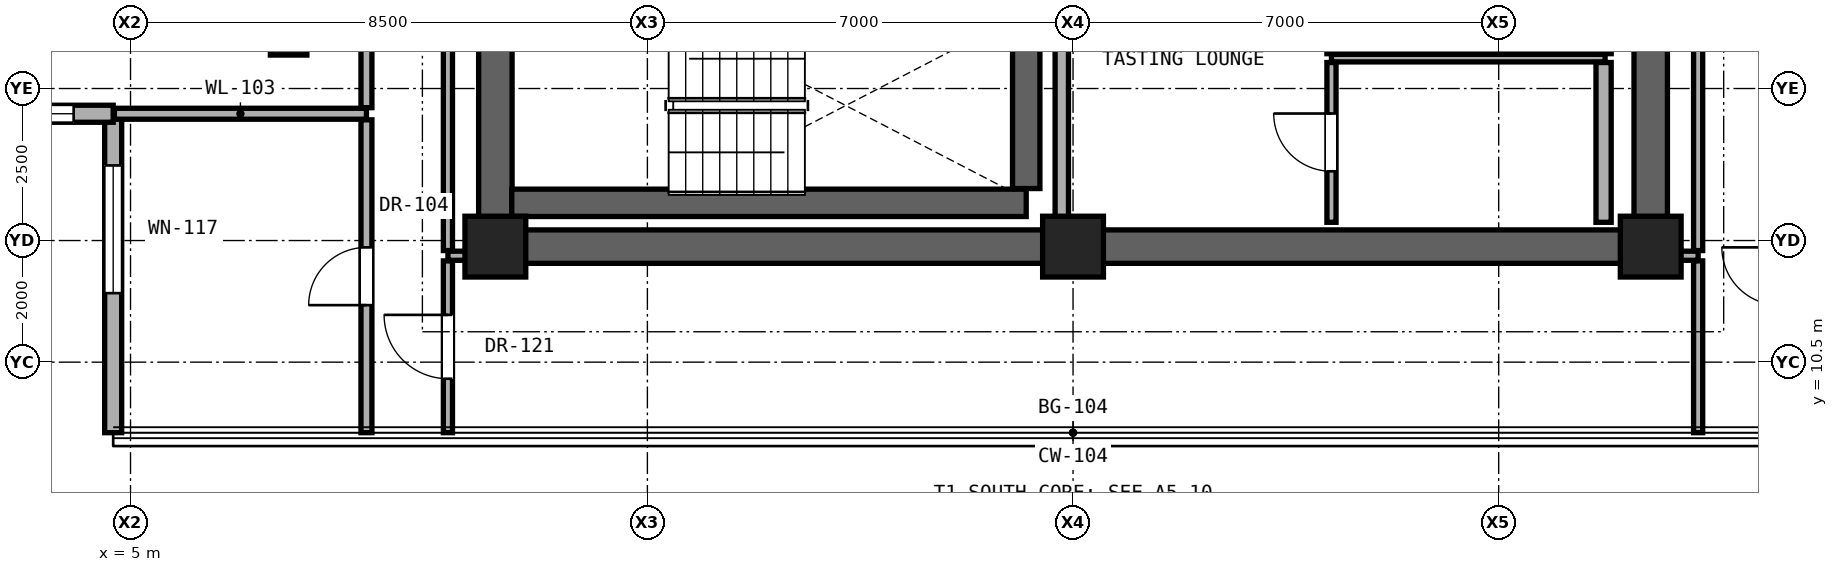
"""IFC4 building model, lengths in metres.
Left out: names, types, materials, properties, quantities, classifications, styles, units other than length and angle.
Written with IfcOpenShell. Run it as: python <this file> out.ifc"""

import sys

from ifc_helpers import new_model, si_unit, direction, frame, frame_2d, origin, origin_2d, place, context, subcontext, project, spatial, rectangle, extrude, element, fill, save


model = new_model("IFC4")
c1 = context("Model", 3, precision=1e-05, world=origin(), true_north=direction((0.0, 1.0)))
c2 = subcontext(c1, "Body", "Model", "MODEL_VIEW")
j1 = project(units=[si_unit("LENGTHUNIT", "METRE"), si_unit("PLANEANGLEUNIT", "RADIAN")], contexts=[c1])
p1 = place(None, origin())
s1 = spatial("IfcSite", under=j1, at=p1, CompositionType="ELEMENT")
p2 = place(p1, origin())
s2 = spatial("IfcBuilding", under=s1, at=p2, CompositionType="ELEMENT")
p3 = place(p2, frame((0.0, 0.0, 170.65)))
s3 = spatial("IfcBuildingStorey", under=s2, at=p3, CompositionType="ELEMENT", Elevation=170.65)
for number, where, z_axis, x_axis in (
    (1, (11.0, 12.4, 0.0), (0.0, 0.0, 1.0), (1.0, 0.0, 0.0)),
    (2, (20.5, 12.4, 0.0), (0.0, 0.0, 1.0), (1.0, 0.0, 0.0)),
    (3, (30.0, 12.4, 0.0), (0.0, 0.0, 1.0), (1.0, 0.0, 0.0)),
):
    element("IfcColumn", number, at=place(p3, frame(where, z_axis=z_axis, x_axis=x_axis)), inside=s3, PredefinedType="COLUMN", context=c2, shape_type="SweptSolid", body=[
        extrude(rectangle(XDim=1.0, YDim=1.0, at=origin_2d()), origin(), (0.0, 0.0, 1.0), 3.25),
    ])
p4 = place(p3, frame((7.6, 16.0, 0.0), z_axis=(0.0, 0.0, 1.0), x_axis=(1.0, 0.0, 0.0)))
e4 = element("IfcColumn", 4, at=p4, inside=s3, PredefinedType="PILASTER", context=c2, shape_type="SweptSolid", body=[
    extrude(rectangle(XDim=0.6, YDim=0.9, at=origin_2d()), origin(), (0.0, 0.0, 1.0), 3.25),
])
p5 = place(p3, frame((11.0, 12.4, 0.0), z_axis=(0.0, 0.0, 1.0), x_axis=(1.0, 0.0, 0.0)))
e5 = element("IfcWall", 5, at=p5, inside=s3, PredefinedType="SHEAR", context=c2, shape_type="SweptSolid", body=[
    extrude(rectangle(XDim=19.0, YDim=0.55, at=frame_2d((9.5, 0.0))), origin(), (0.0, 0.0, 1.0), 3.05),
])
for number, where, z_axis, x_axis in (
    (6, (11.0, 12.4, 0.0), (0.0, 0.0, 1.0), (0.0, 1.0, 0.0)),
    (7, (30.0, 12.4, 0.0), (0.0, 0.0, 1.0), (0.0, 1.0, 0.0)),
):
    element("IfcWall", number, at=place(p3, frame(where, z_axis=z_axis, x_axis=x_axis)), inside=s3, PredefinedType="SHEAR", context=c2, shape_type="SweptSolid", body=[
        extrude(rectangle(XDim=6.0, YDim=0.55, at=frame_2d((3.0, 0.0))), origin(), (0.0, 0.0, 1.0), 3.05),
    ])
p6 = place(p3, frame((4.715, 14.585, 0.0), z_axis=(0.0, 0.0, 1.0), x_axis=(0.0, -1.0, 0.0)))
e8 = element("IfcWall", 8, at=p6, inside=s3, PredefinedType="SOLIDWALL", context=c2, shape_type="SweptSolid", body=[
    extrude(rectangle(XDim=5.245, YDim=0.28, at=frame_2d((2.623, 0.0))), origin(), (0.0, 0.0, 1.0), 3.03),
])
p7 = place(p6, frame((0.85, 0.0, 0.68)))
e9 = element("IfcOpeningElement", 9, at=p7, cuts=e8, PredefinedType="OPENING", context=c2, shape_type="SweptSolid", body=[
    extrude(rectangle(XDim=2.1, YDim=2.2, at=frame_2d((1.05, 1.1))), frame((0.0, 0.15, 0.0), z_axis=(0.0, -1.0, 0.0), x_axis=(1.0, 0.0, 0.0)), (0.0, 0.0, 1.0), 0.3),
])
p8 = place(p3, frame((-0.53, 14.585, 0.0), z_axis=(0.0, 0.0, 1.0), x_axis=(1.0, 0.0, 0.0)))
e10 = element("IfcWall", 10, at=p8, inside=s3, PredefinedType="SOLIDWALL", context=c2, shape_type="SweptSolid", body=[
    extrude(rectangle(XDim=5.245, YDim=0.28, at=frame_2d((2.623, 0.0))), origin(), (0.0, 0.0, 1.0), 3.03),
])
p9 = place(p8, frame((3.495, 0.0, 0.85)))
e11 = element("IfcOpeningElement", 11, at=p9, cuts=e10, PredefinedType="OPENING", context=c2, shape_type="SweptSolid", body=[
    extrude(rectangle(XDim=1.1, YDim=2.0, at=frame_2d((0.55, 1.0))), frame((0.0, 0.15, 0.0), z_axis=(0.0, -1.0, 0.0), x_axis=(1.0, 0.0, 0.0)), (0.0, 0.0, 1.0), 0.3),
])
for number, where, z_axis, x_axis in (
    (12, (10.22, 12.25, 0.0), (0.0, 0.0, 1.0), (1.0, 0.0, 0.0)),
    (13, (30.27, 12.25, 0.0), (0.0, 0.0, 1.0), (1.0, 0.0, 0.0)),
):
    element("IfcWall", number, at=place(p3, frame(where, z_axis=z_axis, x_axis=x_axis)), inside=s3, PredefinedType="PARTITIONING", context=c2, shape_type="SweptSolid", body=[
        extrude(rectangle(XDim=0.51, YDim=0.15, at=frame_2d((0.255, 0.0))), origin(), (0.0, 0.0, 1.0), 3.05),
    ])
p10 = place(p3, frame((11.27, 13.12, 0.0), z_axis=(0.0, 0.0, 1.0), x_axis=(1.0, 0.0, 0.0)))
e14 = element("IfcWall", 14, at=p10, inside=s3, PredefinedType="SHEAR", context=c2, shape_type="SweptSolid", body=[
    extrude(rectangle(XDim=8.46, YDim=0.45, at=frame_2d((4.23, 0.0))), origin(), (0.0, 0.0, 1.0), 3.05),
])
p11 = place(p3, frame((4.735, 14.585, 0.0), z_axis=(0.0, 0.0, 1.0), x_axis=(1.0, 0.0, 0.0)))
e15 = element("IfcWall", 15, at=p11, inside=s3, PredefinedType="PARTITIONING", context=c2, shape_type="SweptSolid", body=[
    extrude(rectangle(XDim=4.145, YDim=0.18, at=frame_2d((2.072, 0.0))), origin(), (0.0, 0.0, 1.0), 3.05),
])
p12 = place(p3, frame((24.75, 15.5, 0.0), z_axis=(0.0, 0.0, 1.0), x_axis=(1.0, 0.0, 0.0)))
e16 = element("IfcWall", 16, at=p12, inside=s3, PredefinedType="PARTITIONING", context=c2, shape_type="SweptSolid", body=[
    extrude(rectangle(XDim=4.5, YDim=0.125, at=frame_2d((2.25, 0.0))), origin(), (0.0, 0.0, 1.0), 3.05),
])
p13 = place(p3, frame((8.88, 9.34, 0.0), z_axis=(0.0, 0.0, 1.0), x_axis=(0.0, 1.0, 0.0)))
e17 = element("IfcWall", 17, at=p13, inside=s3, PredefinedType="PARTITIONING", context=c2, shape_type="SweptSolid", body=[
    extrude(rectangle(XDim=5.145, YDim=0.18, at=frame_2d((2.573, 0.0))), origin(), (0.0, 0.0, 1.0), 3.05),
])
p14 = place(p13, frame((2.097, 0.0, 0.0)))
e18 = element("IfcOpeningElement", 18, at=p14, cuts=e17, PredefinedType="OPENING", context=c2, shape_type="SweptSolid", body=[
    extrude(rectangle(XDim=0.95, YDim=2.15, at=frame_2d((0.475, 1.075))), frame((0.0, 0.1, 0.0), z_axis=(0.0, -1.0, 0.0), x_axis=(1.0, 0.0, 0.0)), (0.0, 0.0, 1.0), 0.2),
])
p15 = place(p3, frame((8.88, 14.685, 0.0), z_axis=(0.0, 0.0, 1.0), x_axis=(0.0, 1.0, 0.0)))
e19 = element("IfcWall", 19, at=p15, inside=s3, PredefinedType="PARTITIONING", context=c2, shape_type="SweptSolid", body=[
    extrude(rectangle(XDim=4.565, YDim=0.18, at=frame_2d((2.282, 0.0))), origin(), (0.0, 0.0, 1.0), 2.442),
])
p16 = place(p15, frame((2.058, 0.0, 0.0)))
e20 = element("IfcOpeningElement", 20, at=p16, cuts=e19, PredefinedType="OPENING", context=c2, shape_type="SweptSolid", body=[
    extrude(rectangle(XDim=1.05, YDim=2.2, at=frame_2d((0.525, 1.1))), frame((0.0, 0.1, 0.0), z_axis=(0.0, -1.0, 0.0), x_axis=(1.0, 0.0, 0.0)), (0.0, 0.0, 1.0), 0.2),
])
p17 = place(p3, frame((10.22, 9.34, 0.0), z_axis=(0.0, 0.0, 1.0), x_axis=(0.0, 1.0, 0.0)))
e21 = element("IfcWall", 21, at=p17, inside=s3, PredefinedType="PARTITIONING", context=c2, shape_type="SweptSolid", body=[
    extrude(rectangle(XDim=2.825, YDim=0.15, at=frame_2d((1.413, 0.0))), origin(), (0.0, 0.0, 1.0), 3.05),
])
p18 = place(p17, frame((0.887, 0.0, 0.0)))
e22 = element("IfcOpeningElement", 22, at=p18, cuts=e21, PredefinedType="OPENING", context=c2, shape_type="SweptSolid", body=[
    extrude(rectangle(XDim=1.05, YDim=2.2, at=frame_2d((0.525, 1.1))), frame((0.0, 0.085, 0.0), z_axis=(0.0, -1.0, 0.0), x_axis=(1.0, 0.0, 0.0)), (0.0, 0.0, 1.0), 0.17),
])
p19 = place(p3, frame((10.22, 12.335, 0.0), z_axis=(0.0, 0.0, 1.0), x_axis=(0.0, 1.0, 0.0)))
e23 = element("IfcWall", 23, at=p19, inside=s3, PredefinedType="PARTITIONING", context=c2, shape_type="SweptSolid", body=[
    extrude(rectangle(XDim=5.98, YDim=0.15, at=frame_2d((2.99, 0.0))), origin(), (0.0, 0.0, 1.0), 2.442),
])
p20 = place(p3, frame((19.73, 13.355, 0.0), z_axis=(0.0, 0.0, 1.0), x_axis=(0.0, 1.0, 0.0)))
e24 = element("IfcWall", 24, at=p20, inside=s3, PredefinedType="SHEAR", context=c2, shape_type="SweptSolid", body=[
    extrude(rectangle(XDim=2.73, YDim=0.45, at=frame_2d((1.365, 0.0))), origin(), (0.0, 0.0, 1.0), 3.05),
])
p21 = place(p3, frame((20.315, 12.8, 0.0), z_axis=(0.0, 0.0, 1.0), x_axis=(0.0, 1.0, 0.0)))
e25 = element("IfcWall", 25, at=p21, inside=s3, PredefinedType="SOLIDWALL", context=c2, shape_type="SweptSolid", body=[
    extrude(rectangle(XDim=3.285, YDim=0.22, at=frame_2d((1.643, 0.0))), origin(), (0.0, 0.0, 1.0), 3.05),
])
p22 = place(p3, frame((24.75, 12.8, 0.0), z_axis=(0.0, 0.0, 1.0), x_axis=(0.0, 1.0, 0.0)))
e26 = element("IfcWall", 26, at=p22, inside=s3, PredefinedType="PARTITIONING", context=c2, shape_type="SweptSolid", body=[
    extrude(rectangle(XDim=2.627, YDim=0.15, at=frame_2d((1.314, 0.0))), origin(), (0.0, 0.0, 1.0), 3.05),
])
p23 = place(p22, frame((0.839, 0.0, 0.0)))
e27 = element("IfcOpeningElement", 27, at=p23, cuts=e26, PredefinedType="OPENING", context=c2, shape_type="SweptSolid", body=[
    extrude(rectangle(XDim=0.95, YDim=2.15, at=frame_2d((0.475, 1.075))), frame((0.0, 0.085, 0.0), z_axis=(0.0, -1.0, 0.0), x_axis=(1.0, 0.0, 0.0)), (0.0, 0.0, 1.0), 0.17),
])
p24 = place(p3, frame((24.75, 15.573, 0.0), z_axis=(0.0, 0.0, 1.0), x_axis=(0.0, 1.0, 0.0)))
e28 = element("IfcWall", 28, at=p24, inside=s3, PredefinedType="PARTITIONING", context=c2, shape_type="SweptSolid", body=[
    extrude(rectangle(XDim=2.557, YDim=0.15, at=frame_2d((1.279, 0.0))), origin(), (0.0, 0.0, 1.0), 3.05),
])
p25 = place(p3, frame((29.225, 12.8, 0.0), z_axis=(0.0, 0.0, 1.0), x_axis=(0.0, 1.0, 0.0)))
e29 = element("IfcWall", 29, at=p25, inside=s3, PredefinedType="SOLIDWALL", context=c2, shape_type="SweptSolid", body=[
    extrude(rectangle(XDim=2.627, YDim=0.25, at=frame_2d((1.314, 0.0))), origin(), (0.0, 0.0, 1.0), 3.05),
])
p26 = place(p3, frame((29.225, 15.573, 0.0), z_axis=(0.0, 0.0, 1.0), x_axis=(0.0, 1.0, 0.0)))
e30 = element("IfcWall", 30, at=p26, inside=s3, PredefinedType="SOLIDWALL", context=c2, shape_type="SweptSolid", body=[
    extrude(rectangle(XDim=2.557, YDim=0.25, at=frame_2d((1.279, 0.0))), origin(), (0.0, 0.0, 1.0), 3.05),
])
p27 = place(p3, frame((30.78, 9.34, 0.0), z_axis=(0.0, 0.0, 1.0), x_axis=(0.0, 1.0, 0.0)))
e31 = element("IfcWall", 31, at=p27, inside=s3, PredefinedType="PARTITIONING", context=c2, shape_type="SweptSolid", body=[
    extrude(rectangle(XDim=2.825, YDim=0.15, at=frame_2d((1.413, 0.0))), origin(), (0.0, 0.0, 1.0), 3.05),
])
p28 = place(p3, frame((30.78, 12.335, 0.0), z_axis=(0.0, 0.0, 1.0), x_axis=(0.0, 1.0, 0.0)))
e32 = element("IfcWall", 32, at=p28, inside=s3, PredefinedType="PARTITIONING", context=c2, shape_type="SweptSolid", body=[
    extrude(rectangle(XDim=5.98, YDim=0.15, at=frame_2d((2.99, 0.0))), origin(), (0.0, 0.0, 1.0), 2.442),
])
p29 = place(p7, origin())
e33 = element("IfcWindow", 33, at=p29, inside=s3, PartitioningType="SINGLE_PANEL", PredefinedType="WINDOW", context=c2, shape_type="SweptSolid", body=[
    extrude(rectangle(XDim=2.1, YDim=2.2, at=frame_2d((1.05, 1.1))), frame((0.0, 0.03, 0.0), z_axis=(0.0, -1.0, 0.0), x_axis=(1.0, 0.0, 0.0)), (0.0, 0.0, 1.0), 0.06),
])
fill(e9, e33)
p30 = place(p9, origin())
e34 = element("IfcWindow", 34, at=p30, inside=s3, PartitioningType="SINGLE_PANEL", PredefinedType="WINDOW", context=c2, shape_type="SweptSolid", body=[
    extrude(rectangle(XDim=1.1, YDim=2.0, at=frame_2d((0.55, 1.0))), frame((0.0, 0.03, 0.0), z_axis=(0.0, -1.0, 0.0), x_axis=(1.0, 0.0, 0.0)), (0.0, 0.0, 1.0), 0.06),
])
fill(e11, e34)
p31 = place(p23, origin())
e35 = element("IfcDoor", 35, at=p31, inside=s3, OperationType="SINGLE_SWING_RIGHT", PredefinedType="DOOR", context=c2, shape_type="SweptSolid", body=[
    extrude(rectangle(XDim=0.95, YDim=2.15, at=frame_2d((0.475, 1.075))), frame((0.0, 0.025, 0.0), z_axis=(0.0, -1.0, 0.0), x_axis=(1.0, 0.0, 0.0)), (0.0, 0.0, 1.0), 0.05),
])
fill(e27, e35)
p32 = place(p18, origin())
e36 = element("IfcDoor", 36, at=p32, inside=s3, OperationType="SINGLE_SWING_RIGHT", PredefinedType="DOOR", context=c2, shape_type="SweptSolid", body=[
    extrude(rectangle(XDim=1.05, YDim=2.2, at=frame_2d((0.525, 1.1))), frame((0.0, 0.025, 0.0), z_axis=(0.0, -1.0, 0.0), x_axis=(1.0, 0.0, 0.0)), (0.0, 0.0, 1.0), 0.05),
])
fill(e22, e36)
p33 = place(p14, origin())
e37 = element("IfcDoor", 37, at=p33, inside=s3, OperationType="SINGLE_SWING_LEFT", PredefinedType="DOOR", context=c2, shape_type="SweptSolid", body=[
    extrude(rectangle(XDim=0.95, YDim=2.15, at=frame_2d((0.475, 1.075))), frame((0.0, 0.025, 0.0), z_axis=(0.0, -1.0, 0.0), x_axis=(1.0, 0.0, 0.0)), (0.0, 0.0, 1.0), 0.05),
])
fill(e18, e37)
save(model, sys.argv[1])
